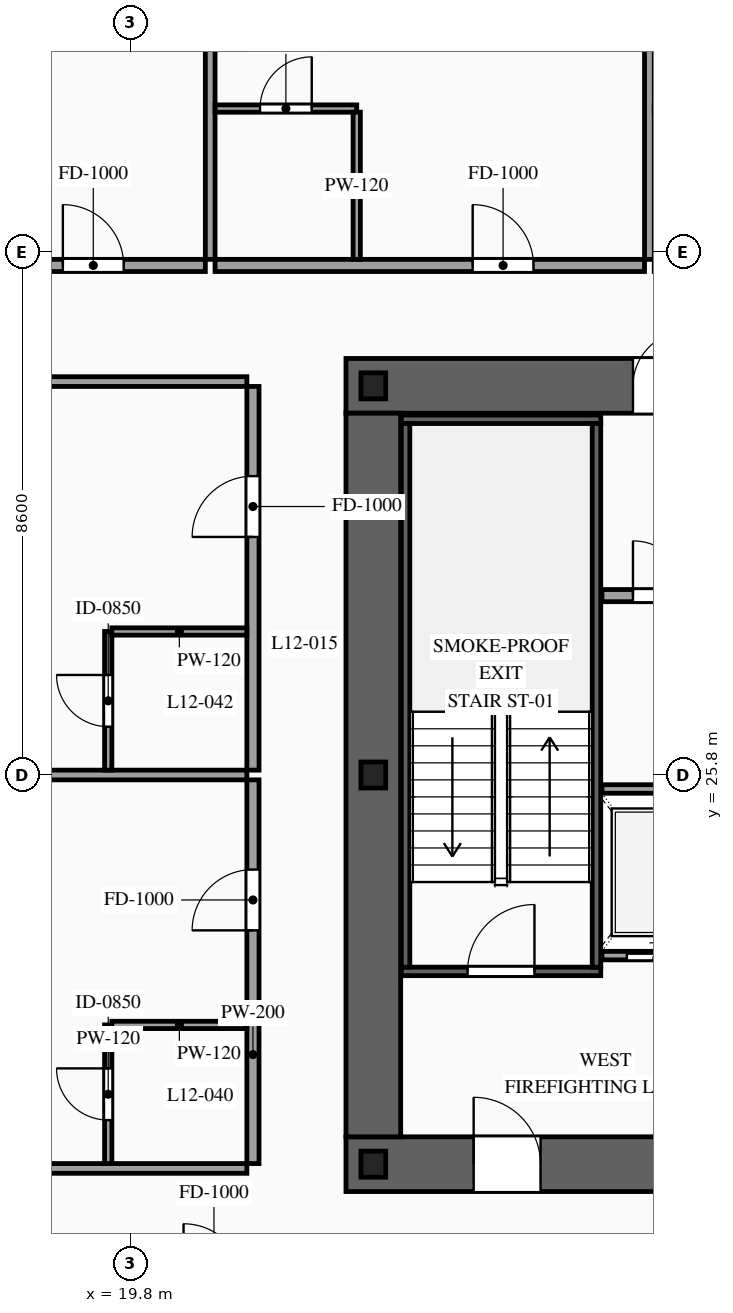
"""IFC4 building model, lengths in metres.
Left out: names, types, materials, properties, quantities, classifications, styles, units other than length and angle.
Written with IfcOpenShell. Run it as: python <this file> out.ifc"""

import sys

from ifc_helpers import new_model, si_unit, direction, frame, frame_2d, origin, origin_2d, place, context, subcontext, project, spatial, rectangle, i_section, extrude, source, transform, mapped, element, fill, save


model = new_model("IFC4")
c1 = context("Model", 3, precision=1e-05, world=origin(), true_north=direction((0.0, 1.0)))
c2 = subcontext(c1, "Body", "Model", "MODEL_VIEW")
j1 = project(units=[si_unit("LENGTHUNIT", "METRE"), si_unit("PLANEANGLEUNIT", "RADIAN")], contexts=[c1])
p1 = place(None, origin())
s1 = spatial("IfcSite", under=j1, at=p1, CompositionType="ELEMENT")
p2 = place(p1, origin())
s2 = spatial("IfcBuilding", under=s1, at=p2, CompositionType="ELEMENT")
p3 = place(p2, frame((0.0, 0.0, 49.6)))
s3 = spatial("IfcBuildingStorey", under=s2, at=p3, CompositionType="ELEMENT", Elevation=49.6)
p4 = place(p3, frame((23.35, 19.4, 0.0), z_axis=(0.0, 0.0, 1.0), x_axis=(1.0, 0.0, 0.0)))
e1 = element("IfcWall", 1, at=p4, inside=s3, PredefinedType="SHEAR", context=c2, shape_type="SweptSolid", body=[
    extrude(rectangle(XDim=27.3, YDim=0.9, at=frame_2d((13.65, 0.0))), origin(), (0.0, 0.0, 1.0), 3.6),
])
p5 = place(p4, frame((2.1, 0.0, 0.0)))
e2 = element("IfcOpeningElement", 2, at=p5, cuts=e1, PredefinedType="OPENING", context=c2, shape_type="SweptSolid", body=[
    extrude(rectangle(XDim=1.1, YDim=2.2, at=frame_2d((0.55, 1.1))), frame((0.0, 0.465, 0.0), z_axis=(0.0, -1.0, 0.0), x_axis=(1.0, 0.0, 0.0)), (0.0, 0.0, 1.0), 0.93),
])
p6 = place(p4, frame((10.0, 0.0, 0.0)))
e3 = element("IfcOpeningElement", 3, at=p6, cuts=e1, PredefinedType="OPENING", context=c2, shape_type="SweptSolid", body=[
    extrude(rectangle(XDim=1.1, YDim=2.2, at=frame_2d((0.55, 1.1))), frame((0.0, 0.465, 0.0), z_axis=(0.0, -1.0, 0.0), x_axis=(1.0, 0.0, 0.0)), (0.0, 0.0, 1.0), 0.93),
])
p7 = place(p4, frame((23.2, 0.0, 0.0)))
e4 = element("IfcOpeningElement", 4, at=p7, cuts=e1, PredefinedType="OPENING", context=c2, shape_type="SweptSolid", body=[
    extrude(rectangle(XDim=1.1, YDim=2.2, at=frame_2d((0.55, 1.1))), frame((0.0, 0.465, 0.0), z_axis=(0.0, -1.0, 0.0), x_axis=(1.0, 0.0, 0.0)), (0.0, 0.0, 1.0), 0.93),
])
p8 = place(p4, frame((19.82, 0.0, 0.0)))
e5 = element("IfcOpeningElement", 5, at=p8, cuts=e1, PredefinedType="OPENING", context=c2, shape_type="SweptSolid", body=[
    extrude(rectangle(XDim=0.9, YDim=2.15, at=frame_2d((0.45, 1.075))), frame((0.0, 0.465, 0.0), z_axis=(0.0, -1.0, 0.0), x_axis=(1.0, 0.0, 0.0)), (0.0, 0.0, 1.0), 0.93),
])
p9 = place(p4, frame((18.38, 0.0, 0.0)))
e6 = element("IfcOpeningElement", 6, at=p9, cuts=e1, PredefinedType="OPENING", context=c2, shape_type="SweptSolid", body=[
    extrude(rectangle(XDim=0.9, YDim=2.15, at=frame_2d((0.45, 1.075))), frame((0.0, 0.465, 0.0), z_axis=(0.0, -1.0, 0.0), x_axis=(1.0, 0.0, 0.0)), (0.0, 0.0, 1.0), 0.93),
])
p10 = place(p3, frame((23.35, 32.2, 0.0), z_axis=(0.0, 0.0, 1.0), x_axis=(1.0, 0.0, 0.0)))
e7 = element("IfcWall", 7, at=p10, inside=s3, PredefinedType="SHEAR", context=c2, shape_type="SweptSolid", body=[
    extrude(rectangle(XDim=27.3, YDim=0.9, at=frame_2d((13.65, 0.0))), origin(), (0.0, 0.0, 1.0), 3.6),
])
p11 = place(p10, frame((4.72, 0.0, 0.0)))
e8 = element("IfcOpeningElement", 8, at=p11, cuts=e7, PredefinedType="OPENING", context=c2, shape_type="SweptSolid", body=[
    extrude(rectangle(XDim=0.9, YDim=2.15, at=frame_2d((0.45, 1.075))), frame((0.0, 0.465, 0.0), z_axis=(0.0, -1.0, 0.0), x_axis=(1.0, 0.0, 0.0)), (0.0, 0.0, 1.0), 0.93),
])
p12 = place(p10, frame((10.0, 0.0, 0.0)))
e9 = element("IfcOpeningElement", 9, at=p12, cuts=e7, PredefinedType="OPENING", context=c2, shape_type="SweptSolid", body=[
    extrude(rectangle(XDim=1.1, YDim=2.2, at=frame_2d((0.55, 1.1))), frame((0.0, 0.465, 0.0), z_axis=(0.0, -1.0, 0.0), x_axis=(1.0, 0.0, 0.0)), (0.0, 0.0, 1.0), 0.93),
])
p13 = place(p10, frame((15.85, 0.0, 0.0)))
e10 = element("IfcOpeningElement", 10, at=p13, cuts=e7, PredefinedType="OPENING", context=c2, shape_type="SweptSolid", body=[
    extrude(rectangle(XDim=1.1, YDim=2.2, at=frame_2d((0.55, 1.1))), frame((0.0, 0.465, 0.0), z_axis=(0.0, -1.0, 0.0), x_axis=(1.0, 0.0, 0.0)), (0.0, 0.0, 1.0), 0.93),
])
p14 = place(p10, frame((19.05, 0.0, 0.0)))
e11 = element("IfcOpeningElement", 11, at=p14, cuts=e7, PredefinedType="OPENING", context=c2, shape_type="SweptSolid", body=[
    extrude(rectangle(XDim=0.9, YDim=2.15, at=frame_2d((0.45, 1.075))), frame((0.0, 0.465, 0.0), z_axis=(0.0, -1.0, 0.0), x_axis=(1.0, 0.0, 0.0)), (0.0, 0.0, 1.0), 0.93),
])
m1 = source(origin(), c2, "Body", "SweptSolid", [
    extrude(rectangle(XDim=11.9, YDim=0.9, at=frame_2d((5.95, 0.0))), origin(), (0.0, 0.0, 1.0), 3.6),
])
p15 = place(p3, frame((23.8, 19.85, 0.0), z_axis=(0.0, 0.0, 1.0), x_axis=(0.0, 1.0, 0.0)))
e12 = element("IfcWall", 12, at=p15, inside=s3, PredefinedType="SHEAR", context=c2, shape_type="MappedRepresentation", body=[
    mapped(m1, transform((0.0, 0.0, 0.0), scale=1.0)),
])
m2 = source(origin(), c2, "Body", "SweptSolid", [
    extrude(i_section(OverallWidth=0.407, OverallDepth=0.428, WebThickness=0.02, FlangeThickness=0.035, at=origin_2d()), origin(), (0.0, 0.0, 1.0), 3.6),
])
for number, where, z_axis, x_axis in (
    (13, (23.8, 19.4, 0.0), (0.0, 0.0, 1.0), (1.0, 0.0, 0.0)),
    (14, (23.8, 25.8, 0.0), (0.0, 0.0, 1.0), (1.0, 0.0, 0.0)),
    (15, (23.8, 32.2, 0.0), (0.0, 0.0, 1.0), (1.0, 0.0, 0.0)),
):
    element("IfcColumn", number, at=place(p3, frame(where, z_axis=z_axis, x_axis=x_axis)), inside=s3, PredefinedType="COLUMN", context=c2, shape_type="MappedRepresentation", body=[
        mapped(m2, transform((0.0, 0.0, 0.0), scale=1.0)),
    ])
p16 = place(p3, frame((27.56, 22.83, 0.0), z_axis=(0.0, 0.0, 1.0), x_axis=(1.0, 0.0, 0.0)))
e16 = element("IfcWall", 16, at=p16, inside=s3, PredefinedType="SOLIDWALL", context=c2, shape_type="SweptSolid", body=[
    extrude(rectangle(XDim=1.92, YDim=0.14, at=frame_2d((0.96, 0.0))), origin(), (0.0, 0.0, 1.0), 3.38),
])
p17 = place(p16, frame((0.41, 0.0, 0.0)))
e17 = element("IfcOpeningElement", 17, at=p17, cuts=e16, PredefinedType="OPENING", context=c2, shape_type="SweptSolid", body=[
    extrude(rectangle(XDim=1.1, YDim=2.2, at=frame_2d((0.55, 1.1))), frame((0.0, 0.085, 0.0), z_axis=(0.0, -1.0, 0.0), x_axis=(1.0, 0.0, 0.0)), (0.0, 0.0, 1.0), 0.17),
])
m3 = source(origin(), c2, "Body", "SweptSolid", [
    extrude(rectangle(XDim=1.92, YDim=0.14, at=frame_2d((0.96, 0.0))), origin(), (0.0, 0.0, 1.0), 3.38),
])
p18 = place(p3, frame((27.56, 25.57, 0.0), z_axis=(0.0, 0.0, 1.0), x_axis=(1.0, 0.0, 0.0)))
e18 = element("IfcWall", 18, at=p18, inside=s3, PredefinedType="SOLIDWALL", context=c2, shape_type="MappedRepresentation", body=[
    mapped(m3, transform((0.0, 0.0, 0.0), scale=1.0)),
])
p19 = place(p3, frame((24.26, 22.57, 0.0), z_axis=(0.0, 0.0, 1.0), x_axis=(1.0, 0.0, 0.0)))
e19 = element("IfcWall", 19, at=p19, inside=s3, PredefinedType="SOLIDWALL", context=c2, shape_type="SweptSolid", body=[
    extrude(rectangle(XDim=3.28, YDim=0.14, at=frame_2d((1.64, 0.0))), origin(), (0.0, 0.0, 1.0), 3.38),
])
p20 = place(p19, frame((1.09, 0.0, 0.0)))
e20 = element("IfcOpeningElement", 20, at=p20, cuts=e19, PredefinedType="OPENING", context=c2, shape_type="SweptSolid", body=[
    extrude(rectangle(XDim=1.1, YDim=2.2, at=frame_2d((0.55, 1.1))), frame((0.0, 0.085, 0.0), z_axis=(0.0, -1.0, 0.0), x_axis=(1.0, 0.0, 0.0)), (0.0, 0.0, 1.0), 0.17),
])
m4 = source(origin(), c2, "Body", "SweptSolid", [
    extrude(rectangle(XDim=3.28, YDim=0.14, at=frame_2d((1.64, 0.0))), origin(), (0.0, 0.0, 1.0), 3.38),
])
p21 = place(p3, frame((24.26, 31.65, 0.0), z_axis=(0.0, 0.0, 1.0), x_axis=(1.0, 0.0, 0.0)))
e21 = element("IfcWall", 21, at=p21, inside=s3, PredefinedType="SOLIDWALL", context=c2, shape_type="MappedRepresentation", body=[
    mapped(m4, transform((0.0, 0.0, 0.0), scale=1.0)),
])
m5 = source(origin(), c2, "Body", "SweptSolid", [
    extrude(rectangle(XDim=8.94, YDim=0.14, at=frame_2d((4.47, 0.0))), origin(), (0.0, 0.0, 1.0), 3.38),
])
for number, where, z_axis, x_axis in (
    (22, (24.33, 22.64, 0.0), (0.0, 0.0, 1.0), (0.0, 1.0, 0.0)),
    (23, (27.47, 22.64, 0.0), (0.0, 0.0, 1.0), (0.0, 1.0, 0.0)),
):
    element("IfcWall", number, at=place(p3, frame(where, z_axis=z_axis, x_axis=x_axis)), inside=s3, PredefinedType="SOLIDWALL", context=c2, shape_type="MappedRepresentation", body=[
        mapped(m5, transform((0.0, 0.0, 0.0), scale=1.0)),
    ])
p22 = place(p3, frame((27.56, 28.75, 0.0), z_axis=(0.0, 0.0, 1.0), x_axis=(1.0, 0.0, 0.0)))
e24 = element("IfcWall", 24, at=p22, inside=s3, PredefinedType="PARTITIONING", context=c2, shape_type="SweptSolid", body=[
    extrude(rectangle(XDim=1.92, YDim=0.2, at=frame_2d((0.96, 0.0))), origin(), (0.0, 0.0, 1.0), 3.38),
])
p23 = place(p22, frame((0.51, 0.0, 0.0)))
e25 = element("IfcOpeningElement", 25, at=p23, cuts=e24, PredefinedType="OPENING", context=c2, shape_type="SweptSolid", body=[
    extrude(rectangle(XDim=0.9, YDim=2.15, at=frame_2d((0.45, 1.075))), frame((0.0, 0.115, 0.0), z_axis=(0.0, -1.0, 0.0), x_axis=(1.0, 0.0, 0.0)), (0.0, 0.0, 1.0), 0.23),
])
p24 = place(p3, frame((14.94, 34.18, 0.0), z_axis=(0.0, 0.0, 1.0), x_axis=(1.0, 0.0, 0.0)))
e26 = element("IfcWall", 26, at=p24, inside=s3, PredefinedType="PARTITIONING", context=c2, shape_type="SweptSolid", body=[
    extrude(rectangle(XDim=6.097, YDim=0.2, at=frame_2d((3.049, 0.0))), origin(), (0.0, 0.0, 1.0), 3.38),
])
p25 = place(p24, frame((3.754, 0.0, 0.0)))
e27 = element("IfcOpeningElement", 27, at=p25, cuts=e26, PredefinedType="OPENING", context=c2, shape_type="SweptSolid", body=[
    extrude(rectangle(XDim=1.0, YDim=2.2, at=frame_2d((0.5, 1.1))), frame((0.0, 0.115, 0.0), z_axis=(0.0, -1.0, 0.0), x_axis=(1.0, 0.0, 0.0)), (0.0, 0.0, 1.0), 0.23),
])
m6 = source(origin(), c2, "Body", "SweptSolid", [
    extrude(rectangle(XDim=16.47, YDim=0.16, at=frame_2d((8.235, 0.0))), origin(), (0.0, 0.0, 1.0), 3.38),
])
p26 = place(p3, frame((21.117, 34.28, 0.0), z_axis=(0.0, 0.0, 1.0), x_axis=(0.0, 1.0, 0.0)))
e28 = element("IfcWall", 28, at=p26, inside=s3, PredefinedType="PARTITIONING", context=c2, shape_type="MappedRepresentation", body=[
    mapped(m6, transform((0.0, 0.0, 0.0), scale=1.0)),
])
p27 = place(p3, frame((21.197, 34.18, 0.0), z_axis=(0.0, 0.0, 1.0), x_axis=(1.0, 0.0, 0.0)))
e29 = element("IfcWall", 29, at=p27, inside=s3, PredefinedType="PARTITIONING", context=c2, shape_type="SweptSolid", body=[
    extrude(rectangle(XDim=7.063, YDim=0.2, at=frame_2d((3.531, 0.0))), origin(), (0.0, 0.0, 1.0), 3.38),
])
p28 = place(p27, frame((4.237, 0.0, 0.0)))
e30 = element("IfcOpeningElement", 30, at=p28, cuts=e29, PredefinedType="OPENING", context=c2, shape_type="SweptSolid", body=[
    extrude(rectangle(XDim=1.0, YDim=2.2, at=frame_2d((0.5, 1.1))), frame((0.0, 0.115, 0.0), z_axis=(0.0, -1.0, 0.0), x_axis=(1.0, 0.0, 0.0)), (0.0, 0.0, 1.0), 0.23),
])
p29 = place(p3, frame((28.34, 34.28, 0.0), z_axis=(0.0, 0.0, 1.0), x_axis=(0.0, 1.0, 0.0)))
e31 = element("IfcWall", 31, at=p29, inside=s3, PredefinedType="PARTITIONING", context=c2, shape_type="MappedRepresentation", body=[
    mapped(m6, transform((0.0, 0.0, 0.0), scale=1.0)),
])
p30 = place(p3, frame((21.197, 36.76, 0.0), z_axis=(0.0, 0.0, 1.0), x_axis=(1.0, 0.0, 0.0)))
e32 = element("IfcWall", 32, at=p30, inside=s3, PredefinedType="PARTITIONING", context=c2, shape_type="SweptSolid", body=[
    extrude(rectangle(XDim=2.33, YDim=0.12, at=frame_2d((1.165, 0.0))), origin(), (0.0, 0.0, 1.0), 3.38),
])
p31 = place(p30, frame((0.74, 0.0, 0.0)))
e33 = element("IfcOpeningElement", 33, at=p31, cuts=e32, PredefinedType="OPENING", context=c2, shape_type="SweptSolid", body=[
    extrude(rectangle(XDim=0.85, YDim=2.1, at=frame_2d((0.425, 1.05))), frame((0.0, 0.075, 0.0), z_axis=(0.0, -1.0, 0.0), x_axis=(1.0, 0.0, 0.0)), (0.0, 0.0, 1.0), 0.15),
])
m7 = source(origin(), c2, "Body", "SweptSolid", [
    extrude(rectangle(XDim=2.42, YDim=0.12, at=frame_2d((1.21, 0.0))), origin(), (0.0, 0.0, 1.0), 3.38),
])
p32 = place(p3, frame((23.527, 34.28, 0.0), z_axis=(0.0, 0.0, 1.0), x_axis=(0.0, 1.0, 0.0)))
e34 = element("IfcWall", 34, at=p32, inside=s3, PredefinedType="PARTITIONING", context=c2, shape_type="MappedRepresentation", body=[
    mapped(m7, transform((0.0, 0.0, 0.0), scale=1.0)),
])
p33 = place(p3, frame((21.82, 19.41, 0.0), z_axis=(0.0, 0.0, 1.0), x_axis=(0.0, 1.0, 0.0)))
e35 = element("IfcWall", 35, at=p33, inside=s3, PredefinedType="PARTITIONING", context=c2, shape_type="SweptSolid", body=[
    extrude(rectangle(XDim=6.31, YDim=0.2, at=frame_2d((3.155, 0.0))), origin(), (0.0, 0.0, 1.0), 3.38),
])
p34 = place(p33, frame((3.835, 0.0, 0.0)))
e36 = element("IfcOpeningElement", 36, at=p34, cuts=e35, PredefinedType="OPENING", context=c2, shape_type="SweptSolid", body=[
    extrude(rectangle(XDim=1.0, YDim=2.2, at=frame_2d((0.5, 1.1))), frame((0.0, 0.115, 0.0), z_axis=(0.0, -1.0, 0.0), x_axis=(1.0, 0.0, 0.0)), (0.0, 0.0, 1.0), 0.23),
])
m8 = source(origin(), c2, "Body", "SweptSolid", [
    extrude(rectangle(XDim=9.67, YDim=0.16, at=frame_2d((4.835, 0.0))), origin(), (0.0, 0.0, 1.0), 2.575),
])
p35 = place(p3, frame((12.05, 25.8, 0.0), z_axis=(0.0, 0.0, 1.0), x_axis=(1.0, 0.0, 0.0)))
e37 = element("IfcWall", 37, at=p35, inside=s3, PredefinedType="PARTITIONING", context=c2, shape_type="MappedRepresentation", body=[
    mapped(m8, transform((0.0, 0.0, 0.0), scale=1.0)),
])
m9 = source(origin(), c2, "Body", "SweptSolid", [
    extrude(rectangle(XDim=9.67, YDim=0.16, at=frame_2d((4.835, 0.0))), origin(), (0.0, 0.0, 1.0), 2.875),
])
p36 = place(p3, frame((12.05, 19.33, 0.0), z_axis=(0.0, 0.0, 1.0), x_axis=(1.0, 0.0, 0.0)))
e38 = element("IfcWall", 38, at=p36, inside=s3, PredefinedType="PARTITIONING", context=c2, shape_type="MappedRepresentation", body=[
    mapped(m9, transform((0.0, 0.0, 0.0), scale=1.0)),
])
p37 = place(p3, frame((19.44, 19.41, 0.0), z_axis=(0.0, 0.0, 1.0), x_axis=(0.0, 1.0, 0.0)))
e39 = element("IfcWall", 39, at=p37, inside=s3, PredefinedType="PARTITIONING", context=c2, shape_type="SweptSolid", body=[
    extrude(rectangle(XDim=2.28, YDim=0.12, at=frame_2d((1.14, 0.0))), origin(), (0.0, 0.0, 1.0), 3.38),
])
p38 = place(p37, frame((0.715, 0.0, 0.0)))
e40 = element("IfcOpeningElement", 40, at=p38, cuts=e39, PredefinedType="OPENING", context=c2, shape_type="SweptSolid", body=[
    extrude(rectangle(XDim=0.85, YDim=2.1, at=frame_2d((0.425, 1.05))), frame((0.0, 0.075, 0.0), z_axis=(0.0, -1.0, 0.0), x_axis=(1.0, 0.0, 0.0)), (0.0, 0.0, 1.0), 0.15),
])
m10 = source(origin(), c2, "Body", "SweptSolid", [
    extrude(rectangle(XDim=2.22, YDim=0.12, at=frame_2d((1.11, 0.0))), origin(), (0.0, 0.0, 1.0), 3.38),
])
p39 = place(p3, frame((19.5, 21.69, 0.0), z_axis=(0.0, 0.0, 1.0), x_axis=(1.0, 0.0, 0.0)))
e41 = element("IfcWall", 41, at=p39, inside=s3, PredefinedType="PARTITIONING", context=c2, shape_type="MappedRepresentation", body=[
    mapped(m10, transform((0.0, 0.0, 0.0), scale=1.0)),
])
p40 = place(p3, frame((21.82, 25.88, 0.0), z_axis=(0.0, 0.0, 1.0), x_axis=(0.0, 1.0, 0.0)))
e42 = element("IfcWall", 42, at=p40, inside=s3, PredefinedType="PARTITIONING", context=c2, shape_type="SweptSolid", body=[
    extrude(rectangle(XDim=6.31, YDim=0.2, at=frame_2d((3.155, 0.0))), origin(), (0.0, 0.0, 1.0), 3.38),
])
p41 = place(p40, frame((3.835, 0.0, 0.0)))
e43 = element("IfcOpeningElement", 43, at=p41, cuts=e42, PredefinedType="OPENING", context=c2, shape_type="SweptSolid", body=[
    extrude(rectangle(XDim=1.0, YDim=2.2, at=frame_2d((0.5, 1.1))), frame((0.0, 0.115, 0.0), z_axis=(0.0, -1.0, 0.0), x_axis=(1.0, 0.0, 0.0)), (0.0, 0.0, 1.0), 0.23),
])
p42 = place(p3, frame((12.05, 32.27, 0.0), z_axis=(0.0, 0.0, 1.0), x_axis=(1.0, 0.0, 0.0)))
e44 = element("IfcWall", 44, at=p42, inside=s3, PredefinedType="PARTITIONING", context=c2, shape_type="MappedRepresentation", body=[
    mapped(m9, transform((0.0, 0.0, 0.0), scale=1.0)),
])
p43 = place(p3, frame((19.44, 25.88, 0.0), z_axis=(0.0, 0.0, 1.0), x_axis=(0.0, 1.0, 0.0)))
e45 = element("IfcWall", 45, at=p43, inside=s3, PredefinedType="PARTITIONING", context=c2, shape_type="SweptSolid", body=[
    extrude(rectangle(XDim=2.28, YDim=0.12, at=frame_2d((1.14, 0.0))), origin(), (0.0, 0.0, 1.0), 3.38),
])
p44 = place(p43, frame((0.715, 0.0, 0.0)))
e46 = element("IfcOpeningElement", 46, at=p44, cuts=e45, PredefinedType="OPENING", context=c2, shape_type="SweptSolid", body=[
    extrude(rectangle(XDim=0.85, YDim=2.1, at=frame_2d((0.425, 1.05))), frame((0.0, 0.075, 0.0), z_axis=(0.0, -1.0, 0.0), x_axis=(1.0, 0.0, 0.0)), (0.0, 0.0, 1.0), 0.15),
])
p45 = place(p3, frame((19.5, 28.16, 0.0), z_axis=(0.0, 0.0, 1.0), x_axis=(1.0, 0.0, 0.0)))
e47 = element("IfcWall", 47, at=p45, inside=s3, PredefinedType="PARTITIONING", context=c2, shape_type="MappedRepresentation", body=[
    mapped(m10, transform((0.0, 0.0, 0.0), scale=1.0)),
])
m11 = source(origin(), c2, "Body", "SweptSolid", [
    extrude(rectangle(XDim=1.1, YDim=2.2, at=frame_2d((0.55, 1.1))), frame((0.0, 0.025, 0.0), z_axis=(0.0, -1.0, 0.0), x_axis=(1.0, 0.0, 0.0)), (0.0, 0.0, 1.0), 0.05),
])
p46 = place(p17, origin())
e48 = element("IfcDoor", 48, at=p46, inside=s3, OperationType="SLIDING_TO_LEFT", PredefinedType="DOOR", context=c2, shape_type="MappedRepresentation", body=[
    mapped(m11, transform((0.0, 0.0, 0.0), scale=1.0)),
])
fill(e17, e48)
m12 = source(origin(), c2, "Body", "SweptSolid", [
    extrude(rectangle(XDim=1.1, YDim=2.2, at=frame_2d((0.55, 1.1))), frame((0.0, 0.025, 0.0), z_axis=(0.0, -1.0, 0.0), x_axis=(1.0, 0.0, 0.0)), (0.0, 0.0, 1.0), 0.05),
])
p47 = place(p20, origin())
e49 = element("IfcDoor", 49, at=p47, inside=s3, OperationType="SINGLE_SWING_RIGHT", PredefinedType="DOOR", context=c2, shape_type="MappedRepresentation", body=[
    mapped(m12, transform((0.0, 0.0, 0.0), scale=1.0)),
])
fill(e20, e49)
p48 = place(p5, origin())
e50 = element("IfcDoor", 50, at=p48, inside=s3, OperationType="SINGLE_SWING_LEFT", PredefinedType="DOOR", context=c2, shape_type="MappedRepresentation", body=[
    mapped(m12, transform((0.0, 0.0, 0.0), scale=1.0)),
])
fill(e2, e50)
m13 = source(origin(), c2, "Body", "SweptSolid", [
    extrude(rectangle(XDim=0.9, YDim=2.15, at=frame_2d((0.45, 1.075))), frame((0.0, 0.025, 0.0), z_axis=(0.0, -1.0, 0.0), x_axis=(1.0, 0.0, 0.0)), (0.0, 0.0, 1.0), 0.05),
])
p49 = place(p11, origin())
e51 = element("IfcDoor", 51, at=p49, inside=s3, OperationType="SINGLE_SWING_RIGHT", PredefinedType="DOOR", context=c2, shape_type="MappedRepresentation", body=[
    mapped(m13, transform((0.0, 0.0, 0.0), scale=1.0)),
])
fill(e8, e51)
p50 = place(p23, origin())
e52 = element("IfcDoor", 52, at=p50, inside=s3, OperationType="SINGLE_SWING_LEFT", PredefinedType="DOOR", context=c2, shape_type="MappedRepresentation", body=[
    mapped(m13, transform((0.0, 0.0, 0.0), scale=1.0)),
])
fill(e25, e52)
m14 = source(origin(), c2, "Body", "SweptSolid", [
    extrude(rectangle(XDim=1.0, YDim=2.2, at=frame_2d((0.5, 1.1))), frame((0.0, 0.025, 0.0), z_axis=(0.0, -1.0, 0.0), x_axis=(1.0, 0.0, 0.0)), (0.0, 0.0, 1.0), 0.05),
])
p51 = place(p25, origin())
e53 = element("IfcDoor", 53, at=p51, inside=s3, OperationType="SINGLE_SWING_LEFT", PredefinedType="DOOR", context=c2, shape_type="MappedRepresentation", body=[
    mapped(m14, transform((0.0, 0.0, 0.0), scale=1.0)),
])
fill(e27, e53)
p52 = place(p28, origin())
e54 = element("IfcDoor", 54, at=p52, inside=s3, OperationType="SINGLE_SWING_LEFT", PredefinedType="DOOR", context=c2, shape_type="MappedRepresentation", body=[
    mapped(m14, transform((0.0, 0.0, 0.0), scale=1.0)),
])
fill(e30, e54)
m15 = source(origin(), c2, "Body", "SweptSolid", [
    extrude(rectangle(XDim=0.85, YDim=2.1, at=frame_2d((0.425, 1.05))), frame((0.0, 0.025, 0.0), z_axis=(0.0, -1.0, 0.0), x_axis=(1.0, 0.0, 0.0)), (0.0, 0.0, 1.0), 0.05),
])
p53 = place(p31, origin())
e55 = element("IfcDoor", 55, at=p53, inside=s3, OperationType="SINGLE_SWING_RIGHT", PredefinedType="DOOR", context=c2, shape_type="MappedRepresentation", body=[
    mapped(m15, transform((0.0, 0.0, 0.0), scale=1.0)),
])
fill(e33, e55)
p54 = place(p34, origin())
e56 = element("IfcDoor", 56, at=p54, inside=s3, OperationType="SINGLE_SWING_LEFT", PredefinedType="DOOR", context=c2, shape_type="MappedRepresentation", body=[
    mapped(m14, transform((0.0, 0.0, 0.0), scale=1.0)),
])
fill(e36, e56)
p55 = place(p38, origin())
e57 = element("IfcDoor", 57, at=p55, inside=s3, OperationType="SINGLE_SWING_RIGHT", PredefinedType="DOOR", context=c2, shape_type="MappedRepresentation", body=[
    mapped(m15, transform((0.0, 0.0, 0.0), scale=1.0)),
])
fill(e40, e57)
p56 = place(p41, origin())
e58 = element("IfcDoor", 58, at=p56, inside=s3, OperationType="SINGLE_SWING_LEFT", PredefinedType="DOOR", context=c2, shape_type="MappedRepresentation", body=[
    mapped(m14, transform((0.0, 0.0, 0.0), scale=1.0)),
])
fill(e43, e58)
p57 = place(p44, origin())
e59 = element("IfcDoor", 59, at=p57, inside=s3, OperationType="SINGLE_SWING_RIGHT", PredefinedType="DOOR", context=c2, shape_type="MappedRepresentation", body=[
    mapped(m15, transform((0.0, 0.0, 0.0), scale=1.0)),
])
fill(e46, e59)
save(model, sys.argv[1])
